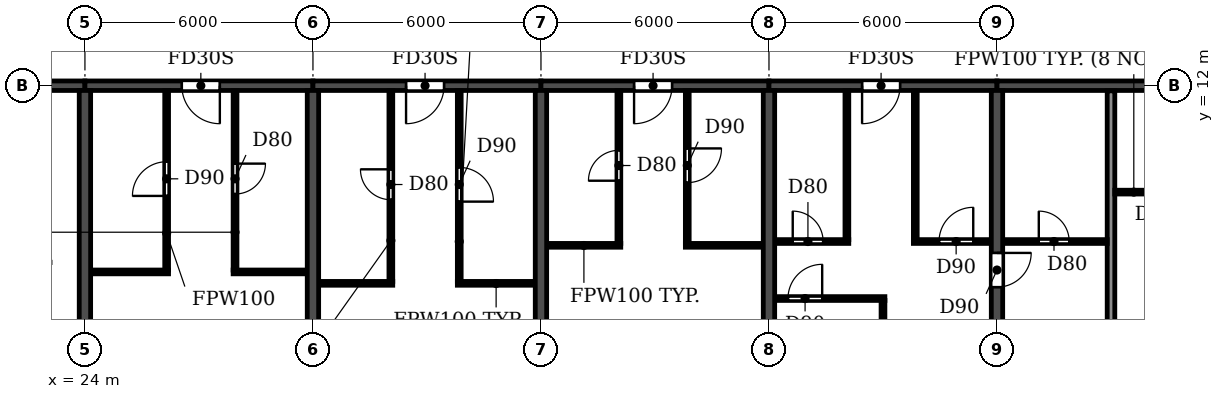
"""IFC4 building model, lengths in metres.
Left out: names, types, materials, properties, quantities, classifications, styles, units other than length and angle.
Written with IfcOpenShell. Run it as: python <this file> out.ifc"""

import sys

from ifc_helpers import new_model, si_unit, direction, frame, frame_2d, origin, place, context, subcontext, project, spatial, rectangle, extrude, element, fill, save


model = new_model("IFC4")
c1 = context("Model", 3, precision=1e-05, world=origin(), true_north=direction((0.0, 1.0)))
c2 = subcontext(c1, "Body", "Model", "MODEL_VIEW")
j1 = project(units=[si_unit("LENGTHUNIT", "METRE"), si_unit("PLANEANGLEUNIT", "RADIAN")], contexts=[c1])
p1 = place(None, origin())
s1 = spatial("IfcSite", under=j1, at=p1, CompositionType="ELEMENT")
p2 = place(p1, origin())
s2 = spatial("IfcBuilding", under=s1, at=p2, CompositionType="ELEMENT")
p3 = place(p2, frame((0.0, 0.0, 162.0)))
s3 = spatial("IfcBuildingStorey", under=s2, at=p3, CompositionType="ELEMENT", Elevation=162.0)
for number, where, z_axis, x_axis in (
    (1, (24.0, 0.2, 0.0), (0.0, 0.0, 1.0), (0.0, 1.0, 0.0)),
    (2, (30.0, 0.2, 0.0), (0.0, 0.0, 1.0), (0.0, 1.0, 0.0)),
    (3, (36.0, 0.2, 0.0), (0.0, 0.0, 1.0), (0.0, 1.0, 0.0)),
    (4, (42.0, 0.2, 0.0), (0.0, 0.0, 1.0), (0.0, 1.0, 0.0)),
):
    element("IfcWall", number, at=place(p3, frame(where, z_axis=z_axis, x_axis=x_axis)), inside=s3, PredefinedType="SHEAR", context=c2, shape_type="SweptSolid", body=[
        extrude(rectangle(XDim=11.675, YDim=0.3, at=frame_2d((5.837, 0.0))), origin(), (0.0, 0.0, 1.0), 2.95),
    ])
p4 = place(p3, frame((48.0, 0.2, 0.0), z_axis=(0.0, 0.0, 1.0), x_axis=(0.0, 1.0, 0.0)))
e5 = element("IfcWall", 5, at=p4, inside=s3, PredefinedType="SHEAR", context=c2, shape_type="SweptSolid", body=[
    extrude(rectangle(XDim=11.675, YDim=0.3, at=frame_2d((5.837, 0.0))), origin(), (0.0, 0.0, 1.0), 2.95),
])
p5 = place(p4, frame((6.5, 0.0, 0.0)))
e6 = element("IfcOpeningElement", 6, at=p5, cuts=e5, PredefinedType="OPENING", context=c2, shape_type="SweptSolid", body=[
    extrude(rectangle(XDim=0.9, YDim=2.1, at=frame_2d((0.45, 1.05))), frame((0.0, 0.16, 0.0), z_axis=(0.0, -1.0, 0.0), x_axis=(1.0, 0.0, 0.0)), (0.0, 0.0, 1.0), 0.32),
])
p6 = place(p3, frame((18.2, 12.0, 0.0), z_axis=(0.0, 0.0, 1.0), x_axis=(1.0, 0.0, 0.0)))
e7 = element("IfcWall", 7, at=p6, inside=s3, PredefinedType="SHEAR", context=c2, shape_type="SweptSolid", body=[
    extrude(rectangle(XDim=5.8, YDim=0.25, at=frame_2d((2.9, 0.0))), origin(), (0.0, 0.0, 1.0), 2.35),
])
p7 = place(p6, frame((2.3, 0.0, 0.0)))
e8 = element("IfcOpeningElement", 8, at=p7, cuts=e7, PredefinedType="OPENING", context=c2, shape_type="SweptSolid", body=[
    extrude(rectangle(XDim=1.0, YDim=2.1, at=frame_2d((0.5, 1.05))), frame((0.0, 0.135, 0.0), z_axis=(0.0, -1.0, 0.0), x_axis=(1.0, 0.0, 0.0)), (0.0, 0.0, 1.0), 0.27),
])
p8 = place(p3, frame((24.0, 12.0, 0.0), z_axis=(0.0, 0.0, 1.0), x_axis=(1.0, 0.0, 0.0)))
e9 = element("IfcWall", 9, at=p8, inside=s3, PredefinedType="SHEAR", context=c2, shape_type="SweptSolid", body=[
    extrude(rectangle(XDim=6.0, YDim=0.25, at=frame_2d((3.0, 0.0))), origin(), (0.0, 0.0, 1.0), 2.35),
])
p9 = place(p8, frame((2.55, 0.0, 0.0)))
e10 = element("IfcOpeningElement", 10, at=p9, cuts=e9, PredefinedType="OPENING", context=c2, shape_type="SweptSolid", body=[
    extrude(rectangle(XDim=1.0, YDim=2.1, at=frame_2d((0.5, 1.05))), frame((0.0, 0.135, 0.0), z_axis=(0.0, -1.0, 0.0), x_axis=(1.0, 0.0, 0.0)), (0.0, 0.0, 1.0), 0.27),
])
p10 = place(p3, frame((30.0, 12.0, 0.0), z_axis=(0.0, 0.0, 1.0), x_axis=(1.0, 0.0, 0.0)))
e11 = element("IfcWall", 11, at=p10, inside=s3, PredefinedType="SHEAR", context=c2, shape_type="SweptSolid", body=[
    extrude(rectangle(XDim=6.0, YDim=0.25, at=frame_2d((3.0, 0.0))), origin(), (0.0, 0.0, 1.0), 2.35),
])
p11 = place(p10, frame((2.45, 0.0, 0.0)))
e12 = element("IfcOpeningElement", 12, at=p11, cuts=e11, PredefinedType="OPENING", context=c2, shape_type="SweptSolid", body=[
    extrude(rectangle(XDim=1.0, YDim=2.1, at=frame_2d((0.5, 1.05))), frame((0.0, 0.135, 0.0), z_axis=(0.0, -1.0, 0.0), x_axis=(1.0, 0.0, 0.0)), (0.0, 0.0, 1.0), 0.27),
])
p12 = place(p3, frame((36.0, 12.0, 0.0), z_axis=(0.0, 0.0, 1.0), x_axis=(1.0, 0.0, 0.0)))
e13 = element("IfcWall", 13, at=p12, inside=s3, PredefinedType="SHEAR", context=c2, shape_type="SweptSolid", body=[
    extrude(rectangle(XDim=6.0, YDim=0.25, at=frame_2d((3.0, 0.0))), origin(), (0.0, 0.0, 1.0), 2.35),
])
p13 = place(p12, frame((2.45, 0.0, 0.0)))
e14 = element("IfcOpeningElement", 14, at=p13, cuts=e13, PredefinedType="OPENING", context=c2, shape_type="SweptSolid", body=[
    extrude(rectangle(XDim=1.0, YDim=2.1, at=frame_2d((0.5, 1.05))), frame((0.0, 0.135, 0.0), z_axis=(0.0, -1.0, 0.0), x_axis=(1.0, 0.0, 0.0)), (0.0, 0.0, 1.0), 0.27),
])
p14 = place(p3, frame((42.0, 12.0, 0.0), z_axis=(0.0, 0.0, 1.0), x_axis=(1.0, 0.0, 0.0)))
e15 = element("IfcWall", 15, at=p14, inside=s3, PredefinedType="SHEAR", context=c2, shape_type="SweptSolid", body=[
    extrude(rectangle(XDim=6.0, YDim=0.25, at=frame_2d((3.0, 0.0))), origin(), (0.0, 0.0, 1.0), 2.35),
])
p15 = place(p14, frame((2.45, 0.0, 0.0)))
e16 = element("IfcOpeningElement", 16, at=p15, cuts=e15, PredefinedType="OPENING", context=c2, shape_type="SweptSolid", body=[
    extrude(rectangle(XDim=1.0, YDim=2.1, at=frame_2d((0.5, 1.05))), frame((0.0, 0.135, 0.0), z_axis=(0.0, -1.0, 0.0), x_axis=(1.0, 0.0, 0.0)), (0.0, 0.0, 1.0), 0.27),
])
p16 = place(p3, frame((48.0, 12.0, 0.0), z_axis=(0.0, 0.0, 1.0), x_axis=(1.0, 0.0, 0.0)))
e17 = element("IfcWall", 17, at=p16, inside=s3, PredefinedType="SHEAR", context=c2, shape_type="SweptSolid", body=[
    extrude(rectangle(XDim=6.0, YDim=0.25, at=frame_2d((3.0, 0.0))), origin(), (0.0, 0.0, 1.0), 2.35),
])
p17 = place(p3, frame((51.0, 0.06, 0.0), z_axis=(0.0, 0.0, 1.0), x_axis=(0.0, 1.0, 0.0)))
e18 = element("IfcWall", 18, at=p17, inside=s3, PredefinedType="PARTITIONING", context=c2, shape_type="SweptSolid", body=[
    extrude(rectangle(XDim=11.805, YDim=0.2, at=frame_2d((5.902, 0.0))), origin(), (0.0, 0.0, 1.0), 2.95),
])
p18 = place(p3, frame((42.16, 6.4, 0.0), z_axis=(0.0, 0.0, 1.0), x_axis=(1.0, 0.0, 0.0)))
e19 = element("IfcWall", 19, at=p18, inside=s3, PredefinedType="PARTITIONING", context=c2, shape_type="SweptSolid", body=[
    extrude(rectangle(XDim=2.89, YDim=0.1, at=frame_2d((1.445, 0.0))), origin(), (0.0, 0.0, 1.0), 2.95),
])
p19 = place(p18, frame((0.34, 0.0, 0.0)))
e20 = element("IfcOpeningElement", 20, at=p19, cuts=e19, PredefinedType="OPENING", context=c2, shape_type="SweptSolid", body=[
    extrude(rectangle(XDim=0.9, YDim=2.1, at=frame_2d((0.45, 1.05))), frame((0.0, 0.06, 0.0), z_axis=(0.0, -1.0, 0.0), x_axis=(1.0, 0.0, 0.0)), (0.0, 0.0, 1.0), 0.12),
])
p20 = place(p3, frame((30.16, 6.8, 0.0), z_axis=(0.0, 0.0, 1.0), x_axis=(1.0, 0.0, 0.0)))
e21 = element("IfcWall", 21, at=p20, inside=s3, PredefinedType="PARTITIONING", context=c2, shape_type="SweptSolid", body=[
    extrude(rectangle(XDim=1.94, YDim=0.1, at=frame_2d((0.97, 0.0))), origin(), (0.0, 0.0, 1.0), 2.95),
])
for number, where, z_axis, x_axis in (
    (22, (33.8, 6.8, 0.0), (0.0, 0.0, 1.0), (1.0, 0.0, 0.0)),
    (23, (24.16, 7.1, 0.0), (0.0, 0.0, 1.0), (1.0, 0.0, 0.0)),
):
    element("IfcWall", number, at=place(p3, frame(where, z_axis=z_axis, x_axis=x_axis)), inside=s3, PredefinedType="PARTITIONING", context=c2, shape_type="SweptSolid", body=[
        extrude(rectangle(XDim=2.04, YDim=0.1, at=frame_2d((1.02, 0.0))), origin(), (0.0, 0.0, 1.0), 2.95),
    ])
for number, where, z_axis, x_axis in (
    (24, (27.9, 7.1, 0.0), (0.0, 0.0, 1.0), (1.0, 0.0, 0.0)),
    (25, (36.16, 7.8, 0.0), (0.0, 0.0, 1.0), (1.0, 0.0, 0.0)),
):
    element("IfcWall", number, at=place(p3, frame(where, z_axis=z_axis, x_axis=x_axis)), inside=s3, PredefinedType="PARTITIONING", context=c2, shape_type="SweptSolid", body=[
        extrude(rectangle(XDim=1.94, YDim=0.1, at=frame_2d((0.97, 0.0))), origin(), (0.0, 0.0, 1.0), 2.95),
    ])
p21 = place(p3, frame((39.8, 7.8, 0.0), z_axis=(0.0, 0.0, 1.0), x_axis=(1.0, 0.0, 0.0)))
e26 = element("IfcWall", 26, at=p21, inside=s3, PredefinedType="PARTITIONING", context=c2, shape_type="SweptSolid", body=[
    extrude(rectangle(XDim=2.04, YDim=0.1, at=frame_2d((1.02, 0.0))), origin(), (0.0, 0.0, 1.0), 2.95),
])
p22 = place(p3, frame((42.16, 7.9, 0.0), z_axis=(0.0, 0.0, 1.0), x_axis=(1.0, 0.0, 0.0)))
e27 = element("IfcWall", 27, at=p22, inside=s3, PredefinedType="PARTITIONING", context=c2, shape_type="SweptSolid", body=[
    extrude(rectangle(XDim=1.94, YDim=0.1, at=frame_2d((0.97, 0.0))), origin(), (0.0, 0.0, 1.0), 2.95),
])
p23 = place(p22, frame((0.465, 0.0, 0.0)))
e28 = element("IfcOpeningElement", 28, at=p23, cuts=e27, PredefinedType="OPENING", context=c2, shape_type="SweptSolid", body=[
    extrude(rectangle(XDim=0.8, YDim=2.1, at=frame_2d((0.4, 1.05))), frame((0.0, 0.06, 0.0), z_axis=(0.0, -1.0, 0.0), x_axis=(1.0, 0.0, 0.0)), (0.0, 0.0, 1.0), 0.12),
])
p24 = place(p3, frame((45.8, 7.9, 0.0), z_axis=(0.0, 0.0, 1.0), x_axis=(1.0, 0.0, 0.0)))
e29 = element("IfcWall", 29, at=p24, inside=s3, PredefinedType="PARTITIONING", context=c2, shape_type="SweptSolid", body=[
    extrude(rectangle(XDim=2.04, YDim=0.1, at=frame_2d((1.02, 0.0))), origin(), (0.0, 0.0, 1.0), 2.95),
])
p25 = place(p24, frame((0.675, 0.0, 0.0)))
e30 = element("IfcOpeningElement", 30, at=p25, cuts=e29, PredefinedType="OPENING", context=c2, shape_type="SweptSolid", body=[
    extrude(rectangle(XDim=0.9, YDim=2.1, at=frame_2d((0.45, 1.05))), frame((0.0, 0.06, 0.0), z_axis=(0.0, -1.0, 0.0), x_axis=(1.0, 0.0, 0.0)), (0.0, 0.0, 1.0), 0.12),
])
p26 = place(p3, frame((48.16, 7.9, 0.0), z_axis=(0.0, 0.0, 1.0), x_axis=(1.0, 0.0, 0.0)))
e31 = element("IfcWall", 31, at=p26, inside=s3, PredefinedType="PARTITIONING", context=c2, shape_type="SweptSolid", body=[
    extrude(rectangle(XDim=2.74, YDim=0.1, at=frame_2d((1.37, 0.0))), origin(), (0.0, 0.0, 1.0), 2.95),
])
p27 = place(p26, frame((0.94, 0.0, 0.0)))
e32 = element("IfcOpeningElement", 32, at=p27, cuts=e31, PredefinedType="OPENING", context=c2, shape_type="SweptSolid", body=[
    extrude(rectangle(XDim=0.8, YDim=2.1, at=frame_2d((0.4, 1.05))), frame((0.0, 0.06, 0.0), z_axis=(0.0, -1.0, 0.0), x_axis=(1.0, 0.0, 0.0)), (0.0, 0.0, 1.0), 0.12),
])
p28 = place(p3, frame((51.1, 9.2, 0.0), z_axis=(0.0, 0.0, 1.0), x_axis=(1.0, 0.0, 0.0)))
e33 = element("IfcWall", 33, at=p28, inside=s3, PredefinedType="PARTITIONING", context=c2, shape_type="SweptSolid", body=[
    extrude(rectangle(XDim=2.74, YDim=0.1, at=frame_2d((1.37, 0.0))), origin(), (0.0, 0.0, 1.0), 2.95),
])
p29 = place(p28, frame((1.0, 0.0, 0.0)))
e34 = element("IfcOpeningElement", 34, at=p29, cuts=e33, PredefinedType="OPENING", context=c2, shape_type="SweptSolid", body=[
    extrude(rectangle(XDim=0.8, YDim=2.1, at=frame_2d((0.4, 1.05))), frame((0.0, 0.06, 0.0), z_axis=(0.0, -1.0, 0.0), x_axis=(1.0, 0.0, 0.0)), (0.0, 0.0, 1.0), 0.12),
])
p30 = place(p3, frame((26.15, 7.15, 0.0), z_axis=(0.0, 0.0, 1.0), x_axis=(0.0, 1.0, 0.0)))
e35 = element("IfcWall", 35, at=p30, inside=s3, PredefinedType="PARTITIONING", context=c2, shape_type="SweptSolid", body=[
    extrude(rectangle(XDim=4.715, YDim=0.1, at=frame_2d((2.357, 0.0))), origin(), (0.0, 0.0, 1.0), 2.95),
])
p31 = place(p30, frame((1.95, 0.0, 0.0)))
e36 = element("IfcOpeningElement", 36, at=p31, cuts=e35, PredefinedType="OPENING", context=c2, shape_type="SweptSolid", body=[
    extrude(rectangle(XDim=0.9, YDim=2.1, at=frame_2d((0.45, 1.05))), frame((0.0, 0.06, 0.0), z_axis=(0.0, -1.0, 0.0), x_axis=(1.0, 0.0, 0.0)), (0.0, 0.0, 1.0), 0.12),
])
p32 = place(p3, frame((27.95, 7.15, 0.0), z_axis=(0.0, 0.0, 1.0), x_axis=(0.0, 1.0, 0.0)))
e37 = element("IfcWall", 37, at=p32, inside=s3, PredefinedType="PARTITIONING", context=c2, shape_type="SweptSolid", body=[
    extrude(rectangle(XDim=4.715, YDim=0.1, at=frame_2d((2.357, 0.0))), origin(), (0.0, 0.0, 1.0), 2.95),
])
p33 = place(p32, frame((2.0, 0.0, 0.0)))
e38 = element("IfcOpeningElement", 38, at=p33, cuts=e37, PredefinedType="OPENING", context=c2, shape_type="SweptSolid", body=[
    extrude(rectangle(XDim=0.8, YDim=2.1, at=frame_2d((0.4, 1.05))), frame((0.0, 0.06, 0.0), z_axis=(0.0, -1.0, 0.0), x_axis=(1.0, 0.0, 0.0)), (0.0, 0.0, 1.0), 0.12),
])
p34 = place(p3, frame((32.05, 6.85, 0.0), z_axis=(0.0, 0.0, 1.0), x_axis=(0.0, 1.0, 0.0)))
e39 = element("IfcWall", 39, at=p34, inside=s3, PredefinedType="PARTITIONING", context=c2, shape_type="SweptSolid", body=[
    extrude(rectangle(XDim=5.015, YDim=0.1, at=frame_2d((2.507, 0.0))), origin(), (0.0, 0.0, 1.0), 2.95),
])
p35 = place(p34, frame((2.15, 0.0, 0.0)))
e40 = element("IfcOpeningElement", 40, at=p35, cuts=e39, PredefinedType="OPENING", context=c2, shape_type="SweptSolid", body=[
    extrude(rectangle(XDim=0.8, YDim=2.1, at=frame_2d((0.4, 1.05))), frame((0.0, 0.06, 0.0), z_axis=(0.0, -1.0, 0.0), x_axis=(1.0, 0.0, 0.0)), (0.0, 0.0, 1.0), 0.12),
])
p36 = place(p3, frame((33.85, 6.85, 0.0), z_axis=(0.0, 0.0, 1.0), x_axis=(0.0, 1.0, 0.0)))
e41 = element("IfcWall", 41, at=p36, inside=s3, PredefinedType="PARTITIONING", context=c2, shape_type="SweptSolid", body=[
    extrude(rectangle(XDim=5.015, YDim=0.1, at=frame_2d((2.507, 0.0))), origin(), (0.0, 0.0, 1.0), 2.95),
])
p37 = place(p36, frame((2.1, 0.0, 0.0)))
e42 = element("IfcOpeningElement", 42, at=p37, cuts=e41, PredefinedType="OPENING", context=c2, shape_type="SweptSolid", body=[
    extrude(rectangle(XDim=0.9, YDim=2.1, at=frame_2d((0.45, 1.05))), frame((0.0, 0.06, 0.0), z_axis=(0.0, -1.0, 0.0), x_axis=(1.0, 0.0, 0.0)), (0.0, 0.0, 1.0), 0.12),
])
p38 = place(p3, frame((38.05, 7.85, 0.0), z_axis=(0.0, 0.0, 1.0), x_axis=(0.0, 1.0, 0.0)))
e43 = element("IfcWall", 43, at=p38, inside=s3, PredefinedType="PARTITIONING", context=c2, shape_type="SweptSolid", body=[
    extrude(rectangle(XDim=4.015, YDim=0.1, at=frame_2d((2.007, 0.0))), origin(), (0.0, 0.0, 1.0), 2.95),
])
p39 = place(p38, frame((1.65, 0.0, 0.0)))
e44 = element("IfcOpeningElement", 44, at=p39, cuts=e43, PredefinedType="OPENING", context=c2, shape_type="SweptSolid", body=[
    extrude(rectangle(XDim=0.8, YDim=2.1, at=frame_2d((0.4, 1.05))), frame((0.0, 0.06, 0.0), z_axis=(0.0, -1.0, 0.0), x_axis=(1.0, 0.0, 0.0)), (0.0, 0.0, 1.0), 0.12),
])
p40 = place(p3, frame((39.85, 7.85, 0.0), z_axis=(0.0, 0.0, 1.0), x_axis=(0.0, 1.0, 0.0)))
e45 = element("IfcWall", 45, at=p40, inside=s3, PredefinedType="PARTITIONING", context=c2, shape_type="SweptSolid", body=[
    extrude(rectangle(XDim=4.015, YDim=0.1, at=frame_2d((2.007, 0.0))), origin(), (0.0, 0.0, 1.0), 2.95),
])
p41 = place(p40, frame((1.6, 0.0, 0.0)))
e46 = element("IfcOpeningElement", 46, at=p41, cuts=e45, PredefinedType="OPENING", context=c2, shape_type="SweptSolid", body=[
    extrude(rectangle(XDim=0.9, YDim=2.1, at=frame_2d((0.45, 1.05))), frame((0.0, 0.06, 0.0), z_axis=(0.0, -1.0, 0.0), x_axis=(1.0, 0.0, 0.0)), (0.0, 0.0, 1.0), 0.12),
])
p42 = place(p3, frame((44.05, 7.95, 0.0), z_axis=(0.0, 0.0, 1.0), x_axis=(0.0, 1.0, 0.0)))
e47 = element("IfcWall", 47, at=p42, inside=s3, PredefinedType="PARTITIONING", context=c2, shape_type="SweptSolid", body=[
    extrude(rectangle(XDim=3.915, YDim=0.1, at=frame_2d((1.958, 0.0))), origin(), (0.0, 0.0, 1.0), 2.95),
])
p43 = place(p3, frame((45.0, 0.06, 0.0), z_axis=(0.0, 0.0, 1.0), x_axis=(0.0, 1.0, 0.0)))
e48 = element("IfcWall", 48, at=p43, inside=s3, PredefinedType="PARTITIONING", context=c2, shape_type="SweptSolid", body=[
    extrude(rectangle(XDim=6.29, YDim=0.1, at=frame_2d((3.145, 0.0))), origin(), (0.0, 0.0, 1.0), 2.95),
])
p44 = place(p3, frame((45.85, 7.95, 0.0), z_axis=(0.0, 0.0, 1.0), x_axis=(0.0, 1.0, 0.0)))
e49 = element("IfcWall", 49, at=p44, inside=s3, PredefinedType="PARTITIONING", context=c2, shape_type="SweptSolid", body=[
    extrude(rectangle(XDim=3.915, YDim=0.1, at=frame_2d((1.958, 0.0))), origin(), (0.0, 0.0, 1.0), 2.95),
])
p45 = place(p31, origin())
e50 = element("IfcDoor", 50, at=p45, inside=s3, OperationType="SINGLE_SWING_LEFT", PredefinedType="DOOR", context=c2, shape_type="SweptSolid", body=[
    extrude(rectangle(XDim=0.9, YDim=2.1, at=frame_2d((0.45, 1.05))), frame((0.0, 0.025, 0.0), z_axis=(0.0, -1.0, 0.0), x_axis=(1.0, 0.0, 0.0)), (0.0, 0.0, 1.0), 0.05),
])
fill(e36, e50)
p46 = place(p9, frame((1.0, 0.0, 0.0), z_axis=(0.0, 0.0, 1.0), x_axis=(-1.0, 0.0, 0.0)))
e51 = element("IfcDoor", 51, at=p46, inside=s3, OperationType="SINGLE_SWING_LEFT", PredefinedType="DOOR", context=c2, shape_type="SweptSolid", body=[
    extrude(rectangle(XDim=1.0, YDim=2.1, at=frame_2d((0.5, 1.05))), frame((0.0, 0.025, 0.0), z_axis=(0.0, -1.0, 0.0), x_axis=(1.0, 0.0, 0.0)), (0.0, 0.0, 1.0), 0.05),
])
fill(e10, e51)
p47 = place(p33, frame((0.8, 0.0, 0.0), z_axis=(0.0, 0.0, 1.0), x_axis=(-1.0, 0.0, 0.0)))
e52 = element("IfcDoor", 52, at=p47, inside=s3, OperationType="SINGLE_SWING_LEFT", PredefinedType="DOOR", context=c2, shape_type="SweptSolid", body=[
    extrude(rectangle(XDim=0.8, YDim=2.1, at=frame_2d((0.4, 1.05))), frame((0.0, 0.025, 0.0), z_axis=(0.0, -1.0, 0.0), x_axis=(1.0, 0.0, 0.0)), (0.0, 0.0, 1.0), 0.05),
])
fill(e38, e52)
p48 = place(p35, origin())
e53 = element("IfcDoor", 53, at=p48, inside=s3, OperationType="SINGLE_SWING_RIGHT", PredefinedType="DOOR", context=c2, shape_type="SweptSolid", body=[
    extrude(rectangle(XDim=0.8, YDim=2.1, at=frame_2d((0.4, 1.05))), frame((0.0, 0.025, 0.0), z_axis=(0.0, -1.0, 0.0), x_axis=(1.0, 0.0, 0.0)), (0.0, 0.0, 1.0), 0.05),
])
fill(e40, e53)
p49 = place(p11, frame((1.0, 0.0, 0.0), z_axis=(0.0, 0.0, 1.0), x_axis=(-1.0, 0.0, 0.0)))
e54 = element("IfcDoor", 54, at=p49, inside=s3, OperationType="SINGLE_SWING_RIGHT", PredefinedType="DOOR", context=c2, shape_type="SweptSolid", body=[
    extrude(rectangle(XDim=1.0, YDim=2.1, at=frame_2d((0.5, 1.05))), frame((0.0, 0.025, 0.0), z_axis=(0.0, -1.0, 0.0), x_axis=(1.0, 0.0, 0.0)), (0.0, 0.0, 1.0), 0.05),
])
fill(e12, e54)
p50 = place(p37, frame((0.9, 0.0, 0.0), z_axis=(0.0, 0.0, 1.0), x_axis=(-1.0, 0.0, 0.0)))
e55 = element("IfcDoor", 55, at=p50, inside=s3, OperationType="SINGLE_SWING_RIGHT", PredefinedType="DOOR", context=c2, shape_type="SweptSolid", body=[
    extrude(rectangle(XDim=0.9, YDim=2.1, at=frame_2d((0.45, 1.05))), frame((0.0, 0.025, 0.0), z_axis=(0.0, -1.0, 0.0), x_axis=(1.0, 0.0, 0.0)), (0.0, 0.0, 1.0), 0.05),
])
fill(e42, e55)
p51 = place(p39, origin())
e56 = element("IfcDoor", 56, at=p51, inside=s3, OperationType="SINGLE_SWING_LEFT", PredefinedType="DOOR", context=c2, shape_type="SweptSolid", body=[
    extrude(rectangle(XDim=0.8, YDim=2.1, at=frame_2d((0.4, 1.05))), frame((0.0, 0.025, 0.0), z_axis=(0.0, -1.0, 0.0), x_axis=(1.0, 0.0, 0.0)), (0.0, 0.0, 1.0), 0.05),
])
fill(e44, e56)
p52 = place(p13, frame((1.0, 0.0, 0.0), z_axis=(0.0, 0.0, 1.0), x_axis=(-1.0, 0.0, 0.0)))
e57 = element("IfcDoor", 57, at=p52, inside=s3, OperationType="SINGLE_SWING_RIGHT", PredefinedType="DOOR", context=c2, shape_type="SweptSolid", body=[
    extrude(rectangle(XDim=1.0, YDim=2.1, at=frame_2d((0.5, 1.05))), frame((0.0, 0.025, 0.0), z_axis=(0.0, -1.0, 0.0), x_axis=(1.0, 0.0, 0.0)), (0.0, 0.0, 1.0), 0.05),
])
fill(e14, e57)
p53 = place(p41, frame((0.9, 0.0, 0.0), z_axis=(0.0, 0.0, 1.0), x_axis=(-1.0, 0.0, 0.0)))
e58 = element("IfcDoor", 58, at=p53, inside=s3, OperationType="SINGLE_SWING_LEFT", PredefinedType="DOOR", context=c2, shape_type="SweptSolid", body=[
    extrude(rectangle(XDim=0.9, YDim=2.1, at=frame_2d((0.45, 1.05))), frame((0.0, 0.025, 0.0), z_axis=(0.0, -1.0, 0.0), x_axis=(1.0, 0.0, 0.0)), (0.0, 0.0, 1.0), 0.05),
])
fill(e46, e58)
p54 = place(p27, origin())
e59 = element("IfcDoor", 59, at=p54, inside=s3, OperationType="SINGLE_SWING_LEFT", PredefinedType="DOOR", context=c2, shape_type="SweptSolid", body=[
    extrude(rectangle(XDim=0.8, YDim=2.1, at=frame_2d((0.4, 1.05))), frame((0.0, 0.025, 0.0), z_axis=(0.0, -1.0, 0.0), x_axis=(1.0, 0.0, 0.0)), (0.0, 0.0, 1.0), 0.05),
])
fill(e32, e59)
p55 = place(p19, origin())
e60 = element("IfcDoor", 60, at=p55, inside=s3, OperationType="SINGLE_SWING_RIGHT", PredefinedType="DOOR", context=c2, shape_type="SweptSolid", body=[
    extrude(rectangle(XDim=0.9, YDim=2.1, at=frame_2d((0.45, 1.05))), frame((0.0, 0.025, 0.0), z_axis=(0.0, -1.0, 0.0), x_axis=(1.0, 0.0, 0.0)), (0.0, 0.0, 1.0), 0.05),
])
fill(e20, e60)
p56 = place(p23, origin())
e61 = element("IfcDoor", 61, at=p56, inside=s3, OperationType="SINGLE_SWING_LEFT", PredefinedType="DOOR", context=c2, shape_type="SweptSolid", body=[
    extrude(rectangle(XDim=0.8, YDim=2.1, at=frame_2d((0.4, 1.05))), frame((0.0, 0.025, 0.0), z_axis=(0.0, -1.0, 0.0), x_axis=(1.0, 0.0, 0.0)), (0.0, 0.0, 1.0), 0.05),
])
fill(e28, e61)
p57 = place(p15, frame((1.0, 0.0, 0.0), z_axis=(0.0, 0.0, 1.0), x_axis=(-1.0, 0.0, 0.0)))
e62 = element("IfcDoor", 62, at=p57, inside=s3, OperationType="SINGLE_SWING_RIGHT", PredefinedType="DOOR", context=c2, shape_type="SweptSolid", body=[
    extrude(rectangle(XDim=1.0, YDim=2.1, at=frame_2d((0.5, 1.05))), frame((0.0, 0.025, 0.0), z_axis=(0.0, -1.0, 0.0), x_axis=(1.0, 0.0, 0.0)), (0.0, 0.0, 1.0), 0.05),
])
fill(e16, e62)
p58 = place(p25, origin())
e63 = element("IfcDoor", 63, at=p58, inside=s3, OperationType="SINGLE_SWING_RIGHT", PredefinedType="DOOR", context=c2, shape_type="SweptSolid", body=[
    extrude(rectangle(XDim=0.9, YDim=2.1, at=frame_2d((0.45, 1.05))), frame((0.0, 0.025, 0.0), z_axis=(0.0, -1.0, 0.0), x_axis=(1.0, 0.0, 0.0)), (0.0, 0.0, 1.0), 0.05),
])
fill(e30, e63)
p59 = place(p5, frame((0.9, 0.0, 0.0), z_axis=(0.0, 0.0, 1.0), x_axis=(-1.0, 0.0, 0.0)))
e64 = element("IfcDoor", 64, at=p59, inside=s3, OperationType="SINGLE_SWING_LEFT", PredefinedType="DOOR", context=c2, shape_type="SweptSolid", body=[
    extrude(rectangle(XDim=0.9, YDim=2.1, at=frame_2d((0.45, 1.05))), frame((0.0, 0.025, 0.0), z_axis=(0.0, -1.0, 0.0), x_axis=(1.0, 0.0, 0.0)), (0.0, 0.0, 1.0), 0.05),
])
fill(e6, e64)
save(model, sys.argv[1])
